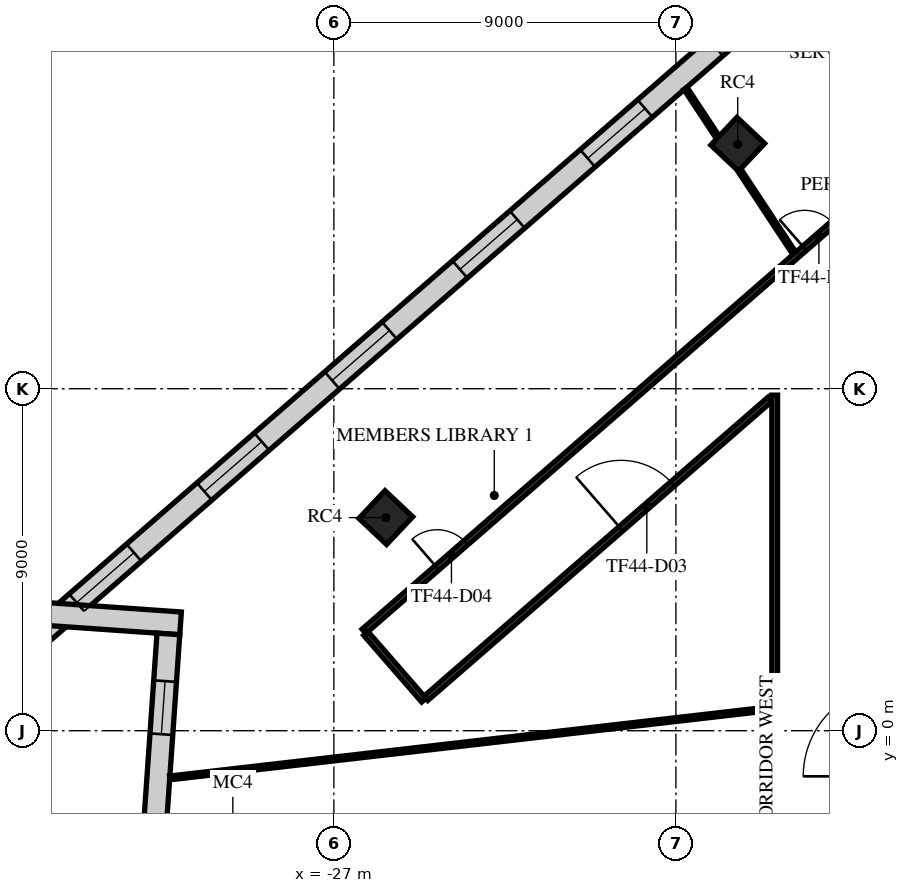
"""IFC4 building model, lengths in metres.
Left out: names, types, materials, properties, quantities, classifications, styles, units other than length and angle.
Written with IfcOpenShell. Run it as: python <this file> out.ifc"""

import sys

from ifc_helpers import new_model, si_unit, direction, frame, frame_2d, origin, origin_2d, place, context, subcontext, project, spatial, rectangle, extrude, element, fill, save


model = new_model("IFC4")
c1 = context("Model", 3, precision=1e-05, world=origin(), true_north=direction((0.0, 1.0)))
c2 = subcontext(c1, "Body", "Model", "MODEL_VIEW")
j1 = project(units=[si_unit("LENGTHUNIT", "METRE"), si_unit("PLANEANGLEUNIT", "RADIAN")], contexts=[c1])
p1 = place(None, origin())
s1 = spatial("IfcSite", under=j1, at=p1, CompositionType="ELEMENT")
p2 = place(p1, origin())
s2 = spatial("IfcBuilding", under=s1, at=p2, CompositionType="ELEMENT")
p3 = place(p2, frame((0.0, 0.0, 193.3)))
s3 = spatial("IfcBuildingStorey", under=s2, at=p3, CompositionType="ELEMENT", Elevation=193.3)
for number, where, z_axis, x_axis in (
    (1, (-16.373, 15.433, 0.0), (0.0, 0.0, 1.0), (0.686, 0.728, 0.0)),
    (2, (-25.633, 5.609, 0.0), (0.0, 0.0, 1.0), (0.686, 0.728, 0.0)),
):
    element("IfcColumn", number, at=place(p3, frame(where, z_axis=z_axis, x_axis=x_axis)), inside=s3, PredefinedType="COLUMN", context=c2, shape_type="SweptSolid", body=[
        extrude(rectangle(XDim=1.0, YDim=1.0, at=origin_2d()), origin(), (0.0, 0.0, 1.0), 4.0),
    ])
p4 = place(p3, frame((2.286, 34.715, 0.0), z_axis=(0.0, 0.0, 1.0), x_axis=(-0.754708272811, -0.656060532993, 0.0)))
e3 = element("IfcWall", 3, at=p4, inside=s3, PredefinedType="STANDARD", context=c2, shape_type="SweptSolid", body=[
    extrude(rectangle(XDim=49.0, YDim=0.6, at=frame_2d((24.5, 0.0))), origin(), (0.0, 0.0, 1.0), 3.62),
])
p5 = place(p4, frame((1.227, 0.0, 0.9)))
e4 = element("IfcOpeningElement", 4, at=p5, cuts=e3, PredefinedType="OPENING", context=c2, shape_type="SweptSolid", body=[
    extrude(rectangle(XDim=2.0, YDim=2.1, at=frame_2d((1.0, 1.05))), frame((0.0, 0.31, 0.0), z_axis=(0.0, -1.0, 0.0), x_axis=(1.0, 0.0, 0.0)), (0.0, 0.0, 1.0), 0.62),
])
p6 = place(p4, frame((5.682, 0.0, 0.9)))
e5 = element("IfcOpeningElement", 5, at=p6, cuts=e3, PredefinedType="OPENING", context=c2, shape_type="SweptSolid", body=[
    extrude(rectangle(XDim=2.0, YDim=2.1, at=frame_2d((1.0, 1.05))), frame((0.0, 0.31, 0.0), z_axis=(0.0, -1.0, 0.0), x_axis=(1.0, 0.0, 0.0)), (0.0, 0.0, 1.0), 0.62),
])
p7 = place(p4, frame((10.136, 0.0, 0.9)))
e6 = element("IfcOpeningElement", 6, at=p7, cuts=e3, PredefinedType="OPENING", context=c2, shape_type="SweptSolid", body=[
    extrude(rectangle(XDim=2.0, YDim=2.1, at=frame_2d((1.0, 1.05))), frame((0.0, 0.31, 0.0), z_axis=(0.0, -1.0, 0.0), x_axis=(1.0, 0.0, 0.0)), (0.0, 0.0, 1.0), 0.62),
])
p8 = place(p4, frame((14.591, 0.0, 0.9)))
e7 = element("IfcOpeningElement", 7, at=p8, cuts=e3, PredefinedType="OPENING", context=c2, shape_type="SweptSolid", body=[
    extrude(rectangle(XDim=2.0, YDim=2.1, at=frame_2d((1.0, 1.05))), frame((0.0, 0.31, 0.0), z_axis=(0.0, -1.0, 0.0), x_axis=(1.0, 0.0, 0.0)), (0.0, 0.0, 1.0), 0.62),
])
p9 = place(p4, frame((19.045, 0.0, 0.9)))
e8 = element("IfcOpeningElement", 8, at=p9, cuts=e3, PredefinedType="OPENING", context=c2, shape_type="SweptSolid", body=[
    extrude(rectangle(XDim=2.0, YDim=2.1, at=frame_2d((1.0, 1.05))), frame((0.0, 0.31, 0.0), z_axis=(0.0, -1.0, 0.0), x_axis=(1.0, 0.0, 0.0)), (0.0, 0.0, 1.0), 0.62),
])
p10 = place(p4, frame((23.5, 0.0, 0.9)))
e9 = element("IfcOpeningElement", 9, at=p10, cuts=e3, PredefinedType="OPENING", context=c2, shape_type="SweptSolid", body=[
    extrude(rectangle(XDim=2.0, YDim=2.1, at=frame_2d((1.0, 1.05))), frame((0.0, 0.31, 0.0), z_axis=(0.0, -1.0, 0.0), x_axis=(1.0, 0.0, 0.0)), (0.0, 0.0, 1.0), 0.62),
])
p11 = place(p4, frame((27.955, 0.0, 0.9)))
e10 = element("IfcOpeningElement", 10, at=p11, cuts=e3, PredefinedType="OPENING", context=c2, shape_type="SweptSolid", body=[
    extrude(rectangle(XDim=2.0, YDim=2.1, at=frame_2d((1.0, 1.05))), frame((0.0, 0.31, 0.0), z_axis=(0.0, -1.0, 0.0), x_axis=(1.0, 0.0, 0.0)), (0.0, 0.0, 1.0), 0.62),
])
p12 = place(p4, frame((32.409, 0.0, 0.9)))
e11 = element("IfcOpeningElement", 11, at=p12, cuts=e3, PredefinedType="OPENING", context=c2, shape_type="SweptSolid", body=[
    extrude(rectangle(XDim=2.0, YDim=2.1, at=frame_2d((1.0, 1.05))), frame((0.0, 0.31, 0.0), z_axis=(0.0, -1.0, 0.0), x_axis=(1.0, 0.0, 0.0)), (0.0, 0.0, 1.0), 0.62),
])
p13 = place(p4, frame((36.864, 0.0, 0.9)))
e12 = element("IfcOpeningElement", 12, at=p13, cuts=e3, PredefinedType="OPENING", context=c2, shape_type="SweptSolid", body=[
    extrude(rectangle(XDim=2.0, YDim=2.1, at=frame_2d((1.0, 1.05))), frame((0.0, 0.31, 0.0), z_axis=(0.0, -1.0, 0.0), x_axis=(1.0, 0.0, 0.0)), (0.0, 0.0, 1.0), 0.62),
])
p14 = place(p4, frame((41.318, 0.0, 0.9)))
e13 = element("IfcOpeningElement", 13, at=p14, cuts=e3, PredefinedType="OPENING", context=c2, shape_type="SweptSolid", body=[
    extrude(rectangle(XDim=2.0, YDim=2.1, at=frame_2d((1.0, 1.05))), frame((0.0, 0.31, 0.0), z_axis=(0.0, -1.0, 0.0), x_axis=(1.0, 0.0, 0.0)), (0.0, 0.0, 1.0), 0.62),
])
p15 = place(p4, frame((45.773, 0.0, 0.9)))
e14 = element("IfcOpeningElement", 14, at=p15, cuts=e3, PredefinedType="OPENING", context=c2, shape_type="SweptSolid", body=[
    extrude(rectangle(XDim=2.0, YDim=2.1, at=frame_2d((1.0, 1.05))), frame((0.0, 0.31, 0.0), z_axis=(0.0, -1.0, 0.0), x_axis=(1.0, 0.0, 0.0)), (0.0, 0.0, 1.0), 0.62),
])
p16 = place(p3, frame((-34.871, 3.094, 0.0), z_axis=(0.0, 0.0, 1.0), x_axis=(0.997563916762, -0.069758382828, 0.0)))
e15 = element("IfcWall", 15, at=p16, inside=s3, PredefinedType="STANDARD", context=c2, shape_type="SweptSolid", body=[
    extrude(rectangle(XDim=3.846, YDim=0.6, at=frame_2d((1.923, 0.0))), origin(), (0.0, 0.0, 1.0), 3.62),
])
p17 = place(p3, frame((-31.354, 2.547, 0.0), z_axis=(0.0, 0.0, 1.0), x_axis=(-0.069743544409, -0.997564954283, 0.0)))
e16 = element("IfcWall", 16, at=p17, inside=s3, PredefinedType="STANDARD", context=c2, shape_type="SweptSolid", body=[
    extrude(rectangle(XDim=7.778, YDim=0.6, at=frame_2d((3.889, 0.0))), origin(), (0.0, 0.0, 1.0), 3.62),
])
p18 = place(p17, frame((1.244, 0.0, 0.9)))
e17 = element("IfcOpeningElement", 17, at=p18, cuts=e16, PredefinedType="OPENING", context=c2, shape_type="SweptSolid", body=[
    extrude(rectangle(XDim=1.4, YDim=2.1, at=frame_2d((0.7, 1.05))), frame((0.0, 0.31, 0.0), z_axis=(0.0, -1.0, 0.0), x_axis=(1.0, 0.0, 0.0)), (0.0, 0.0, 1.0), 0.62),
])
p19 = place(p17, frame((5.134, 0.0, 0.9)))
e18 = element("IfcOpeningElement", 18, at=p19, cuts=e16, PredefinedType="OPENING", context=c2, shape_type="SweptSolid", body=[
    extrude(rectangle(XDim=1.4, YDim=2.1, at=frame_2d((0.7, 1.05))), frame((0.0, 0.31, 0.0), z_axis=(0.0, -1.0, 0.0), x_axis=(1.0, 0.0, 0.0)), (0.0, 0.0, 1.0), 0.62),
])
p20 = place(p3, frame((-26.208, 2.616, 0.0), z_axis=(0.0, 0.0, 1.0), x_axis=(0.754710701231, 0.656057739416, 0.0)))
e19 = element("IfcWall", 19, at=p20, inside=s3, PredefinedType="PARTITIONING", context=c2, shape_type="SweptSolid", body=[
    extrude(rectangle(XDim=36.126, YDim=0.15, at=frame_2d((18.063, 0.0))), origin(), (0.0, 0.0, 1.0), 3.17),
])
p21 = place(p20, frame((2.551, 0.0, 0.0)))
e20 = element("IfcOpeningElement", 20, at=p21, cuts=e19, PredefinedType="OPENING", context=c2, shape_type="SweptSolid", body=[
    extrude(rectangle(XDim=1.0, YDim=2.1, at=frame_2d((0.5, 1.05))), frame((0.0, 0.085, 0.0), z_axis=(0.0, -1.0, 0.0), x_axis=(1.0, 0.0, 0.0)), (0.0, 0.0, 1.0), 0.17),
])
p22 = place(p20, frame((15.362, 0.0, 0.0)))
e21 = element("IfcOpeningElement", 21, at=p22, cuts=e19, PredefinedType="OPENING", context=c2, shape_type="SweptSolid", body=[
    extrude(rectangle(XDim=1.0, YDim=2.1, at=frame_2d((0.5, 1.05))), frame((0.0, 0.085, 0.0), z_axis=(0.0, -1.0, 0.0), x_axis=(1.0, 0.0, 0.0)), (0.0, 0.0, 1.0), 0.17),
])
p23 = place(p20, frame((25.542, 0.0, 0.0)))
e22 = element("IfcOpeningElement", 22, at=p23, cuts=e19, PredefinedType="OPENING", context=c2, shape_type="SweptSolid", body=[
    extrude(rectangle(XDim=1.8, YDim=2.1, at=frame_2d((0.9, 1.05))), frame((0.0, 0.085, 0.0), z_axis=(0.0, -1.0, 0.0), x_axis=(1.0, 0.0, 0.0)), (0.0, 0.0, 1.0), 0.17),
])
p24 = place(p3, frame((-26.159, 2.559, 0.0), z_axis=(0.0, 0.0, 1.0), x_axis=(0.65619691316, -0.754589697226, 0.0)))
e23 = element("IfcWall", 23, at=p24, inside=s3, PredefinedType="PARTITIONING", context=c2, shape_type="SweptSolid", body=[
    extrude(rectangle(XDim=2.325, YDim=0.15, at=frame_2d((1.163, 0.0))), origin(), (0.0, 0.0, 1.0), 3.17),
])
p25 = place(p3, frame((-24.576, 0.854, 0.0), z_axis=(0.0, 0.0, 1.0), x_axis=(0.75472382762, 0.656042638875, 0.0)))
e24 = element("IfcWall", 24, at=p25, inside=s3, PredefinedType="PARTITIONING", context=c2, shape_type="SweptSolid", body=[
    extrude(rectangle(XDim=11.994, YDim=0.15, at=frame_2d((5.997, 0.0))), origin(), (0.0, 0.0, 1.0), 3.17),
])
p26 = place(p25, frame((6.8, 0.0, 0.0)))
e25 = element("IfcOpeningElement", 25, at=p26, cuts=e24, PredefinedType="OPENING", context=c2, shape_type="SweptSolid", body=[
    extrude(rectangle(XDim=1.8, YDim=2.1, at=frame_2d((0.9, 1.05))), frame((0.0, 0.085, 0.0), z_axis=(0.0, -1.0, 0.0), x_axis=(1.0, 0.0, 0.0)), (0.0, 0.0, 1.0), 0.17),
])
p27 = place(p3, frame((-15.4, -11.834, 0.0), z_axis=(0.0, 0.0, 1.0), x_axis=(0.0, 1.0, 0.0)))
e26 = element("IfcWall", 26, at=p27, inside=s3, PredefinedType="PARTITIONING", context=c2, shape_type="SweptSolid", body=[
    extrude(rectangle(XDim=20.666, YDim=0.15, at=frame_2d((10.333, 0.0))), origin(), (0.0, 0.0, 1.0), 3.17),
])
p28 = place(p3, frame((-31.316, -1.242, 0.0), z_axis=(0.0, 0.0, 1.0), x_axis=(0.993421473136, 0.114515399452, 0.0)))
e27 = element("IfcWall", 27, at=p28, inside=s3, PredefinedType="PARTITIONING", context=c2, shape_type="SweptSolid", body=[
    extrude(rectangle(XDim=15.941, YDim=0.1, at=frame_2d((7.97, 0.0))), origin(), (0.0, 0.0, 1.0), 3.17),
])
p29 = place(p3, frame((-17.747, 16.901, 0.0), z_axis=(0.0, 0.0, 1.0), x_axis=(0.550725721205, -0.834686276396, 0.0)))
e28 = element("IfcWall", 28, at=p29, inside=s3, PredefinedType="PARTITIONING", context=c2, shape_type="SweptSolid", body=[
    extrude(rectangle(XDim=1.548, YDim=0.1, at=frame_2d((0.774, 0.0))), origin(), (0.0, 0.0, 1.0), 3.62),
])
p30 = place(p3, frame((-16.328, 14.751, 0.0), z_axis=(0.0, 0.0, 1.0), x_axis=(0.550713616712, -0.83469426281, 0.0)))
e29 = element("IfcWall", 29, at=p30, inside=s3, PredefinedType="PARTITIONING", context=c2, shape_type="SweptSolid", body=[
    extrude(rectangle(XDim=2.619, YDim=0.1, at=frame_2d((1.309, 0.0))), origin(), (0.0, 0.0, 1.0), 3.17),
])
p31 = place(p11, origin())
e30 = element("IfcWindow", 30, at=p31, inside=s3, PartitioningType="SINGLE_PANEL", PredefinedType="WINDOW", context=c2, shape_type="SweptSolid", body=[
    extrude(rectangle(XDim=2.0, YDim=2.1, at=frame_2d((1.0, 1.05))), frame((0.0, 0.03, 0.0), z_axis=(0.0, -1.0, 0.0), x_axis=(1.0, 0.0, 0.0)), (0.0, 0.0, 1.0), 0.06),
])
fill(e10, e30)
p32 = place(p12, origin())
e31 = element("IfcWindow", 31, at=p32, inside=s3, PartitioningType="SINGLE_PANEL", PredefinedType="WINDOW", context=c2, shape_type="SweptSolid", body=[
    extrude(rectangle(XDim=2.0, YDim=2.1, at=frame_2d((1.0, 1.05))), frame((0.0, 0.03, 0.0), z_axis=(0.0, -1.0, 0.0), x_axis=(1.0, 0.0, 0.0)), (0.0, 0.0, 1.0), 0.06),
])
fill(e11, e31)
p33 = place(p13, origin())
e32 = element("IfcWindow", 32, at=p33, inside=s3, PartitioningType="SINGLE_PANEL", PredefinedType="WINDOW", context=c2, shape_type="SweptSolid", body=[
    extrude(rectangle(XDim=2.0, YDim=2.1, at=frame_2d((1.0, 1.05))), frame((0.0, 0.03, 0.0), z_axis=(0.0, -1.0, 0.0), x_axis=(1.0, 0.0, 0.0)), (0.0, 0.0, 1.0), 0.06),
])
fill(e12, e32)
p34 = place(p14, origin())
e33 = element("IfcWindow", 33, at=p34, inside=s3, PartitioningType="SINGLE_PANEL", PredefinedType="WINDOW", context=c2, shape_type="SweptSolid", body=[
    extrude(rectangle(XDim=2.0, YDim=2.1, at=frame_2d((1.0, 1.05))), frame((0.0, 0.03, 0.0), z_axis=(0.0, -1.0, 0.0), x_axis=(1.0, 0.0, 0.0)), (0.0, 0.0, 1.0), 0.06),
])
fill(e13, e33)
p35 = place(p15, origin())
e34 = element("IfcWindow", 34, at=p35, inside=s3, PartitioningType="SINGLE_PANEL", PredefinedType="WINDOW", context=c2, shape_type="SweptSolid", body=[
    extrude(rectangle(XDim=2.0, YDim=2.1, at=frame_2d((1.0, 1.05))), frame((0.0, 0.03, 0.0), z_axis=(0.0, -1.0, 0.0), x_axis=(1.0, 0.0, 0.0)), (0.0, 0.0, 1.0), 0.06),
])
fill(e14, e34)
p36 = place(p18, origin())
e35 = element("IfcWindow", 35, at=p36, inside=s3, PartitioningType="SINGLE_PANEL", PredefinedType="WINDOW", context=c2, shape_type="SweptSolid", body=[
    extrude(rectangle(XDim=1.4, YDim=2.1, at=frame_2d((0.7, 1.05))), frame((0.0, 0.03, 0.0), z_axis=(0.0, -1.0, 0.0), x_axis=(1.0, 0.0, 0.0)), (0.0, 0.0, 1.0), 0.06),
])
fill(e17, e35)
p37 = place(p26, frame((1.8, 0.0, 0.0), z_axis=(0.0, 0.0, 1.0), x_axis=(-1.0, 0.0, 0.0)))
e36 = element("IfcDoor", 36, at=p37, inside=s3, OperationType="DOUBLE_DOOR_SINGLE_SWING", PredefinedType="DOOR", context=c2, shape_type="SweptSolid", body=[
    extrude(rectangle(XDim=1.8, YDim=2.1, at=frame_2d((0.9, 1.05))), frame((0.0, 0.025, 0.0), z_axis=(0.0, -1.0, 0.0), x_axis=(1.0, 0.0, 0.0)), (0.0, 0.0, 1.0), 0.05),
])
fill(e25, e36)
p38 = place(p21, origin())
e37 = element("IfcDoor", 37, at=p38, inside=s3, OperationType="SINGLE_SWING_LEFT", PredefinedType="DOOR", context=c2, shape_type="SweptSolid", body=[
    extrude(rectangle(XDim=1.0, YDim=2.1, at=frame_2d((0.5, 1.05))), frame((0.0, 0.025, 0.0), z_axis=(0.0, -1.0, 0.0), x_axis=(1.0, 0.0, 0.0)), (0.0, 0.0, 1.0), 0.05),
])
fill(e20, e37)
p39 = place(p22, origin())
e38 = element("IfcDoor", 38, at=p39, inside=s3, OperationType="SINGLE_SWING_RIGHT", PredefinedType="DOOR", context=c2, shape_type="SweptSolid", body=[
    extrude(rectangle(XDim=1.0, YDim=2.1, at=frame_2d((0.5, 1.05))), frame((0.0, 0.025, 0.0), z_axis=(0.0, -1.0, 0.0), x_axis=(1.0, 0.0, 0.0)), (0.0, 0.0, 1.0), 0.05),
])
fill(e21, e38)
save(model, sys.argv[1])
